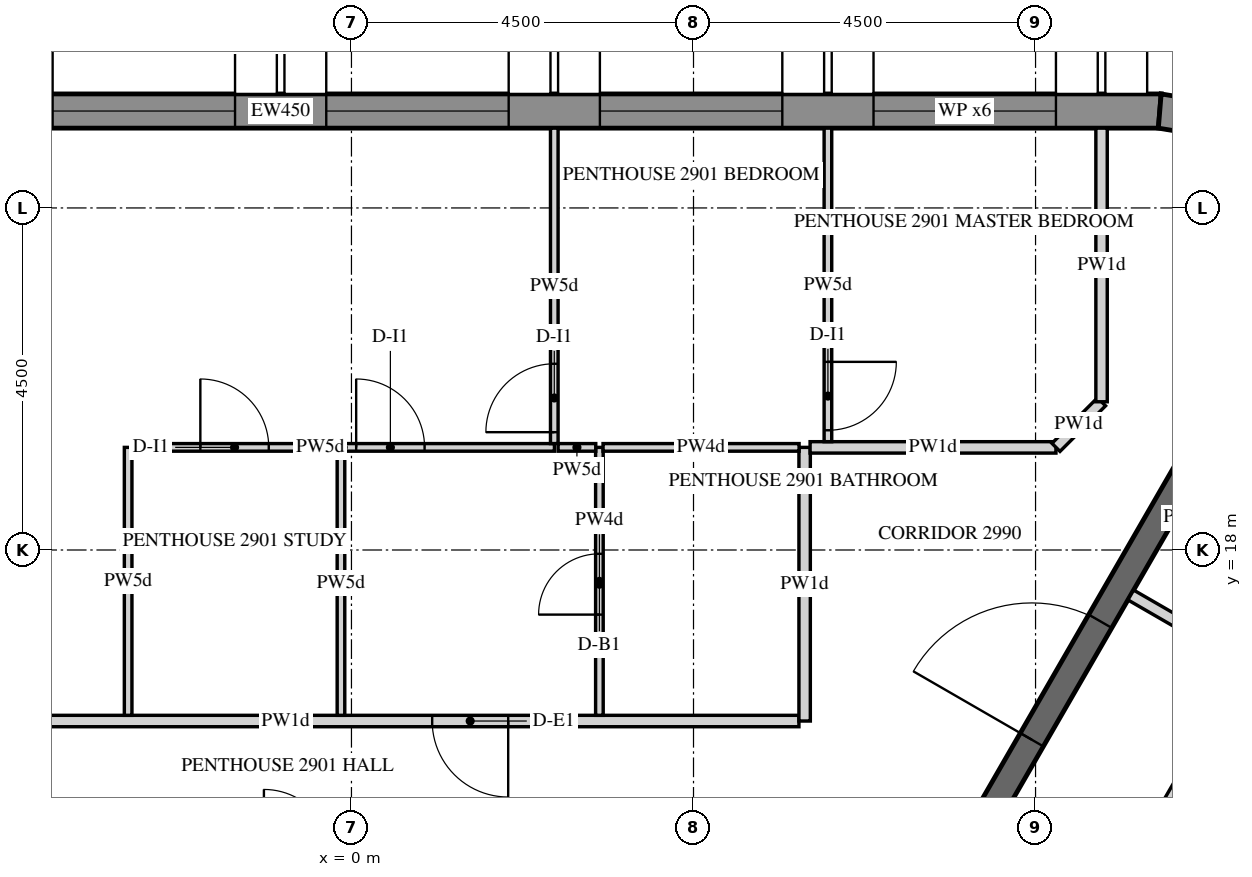
"""IFC4 building model, lengths in metres.
Left out: names, types, materials, properties, quantities, classifications, styles, units other than length and angle.
Written with IfcOpenShell. Run it as: python <this file> out.ifc"""

import sys

from ifc_helpers import new_model, si_unit, direction, frame, frame_2d, origin, place, context, subcontext, project, spatial, polyline, rectangle, outline, extrude, element, fill, save


model = new_model("IFC4")
c1 = context("Model", 3, precision=1e-05, world=origin(), true_north=direction((0.0, 1.0)))
c2 = subcontext(c1, "Body", "Model", "MODEL_VIEW")
j1 = project(units=[si_unit("LENGTHUNIT", "METRE"), si_unit("PLANEANGLEUNIT", "RADIAN")], contexts=[c1])
p1 = place(None, origin())
s1 = spatial("IfcSite", under=j1, at=p1, CompositionType="ELEMENT")
p2 = place(p1, origin())
s2 = spatial("IfcBuilding", under=s1, at=p2, CompositionType="ELEMENT")
p3 = place(p2, frame((0.0, 0.0, 369.0)))
s3 = spatial("IfcBuildingStorey", under=s2, at=p3, CompositionType="ELEMENT", Elevation=369.0)
p4 = place(p3, frame((10.634, 23.775, -0.15), z_axis=(0.0, 0.0, 1.0), x_axis=(-1.0, 0.0, 0.0)))
e1 = element("IfcWall", 1, at=p4, inside=s3, PredefinedType="SOLIDWALL", context=c2, shape_type="SweptSolid", body=[
    extrude(outline(polyline([(-0.018, -0.225), (23.153, -0.225), (23.111, 0.225), (0.018, 0.225), (-0.018, -0.225)])), origin(), (0.0, 0.0, 1.0), 3.9),
])
p5 = place(p4, frame((1.366, 0.0, 0.45)))
e2 = element("IfcOpeningElement", 2, at=p5, cuts=e1, PredefinedType="OPENING", context=c2, shape_type="SweptSolid", body=[
    extrude(rectangle(XDim=2.4, YDim=3.0, at=frame_2d((1.2, 1.5))), frame((0.0, 0.235, 0.0), z_axis=(0.0, -1.0, 0.0), x_axis=(1.0, 0.0, 0.0)), (0.0, 0.0, 1.0), 0.47),
])
p6 = place(p4, frame((4.966, 0.0, 0.45)))
e3 = element("IfcOpeningElement", 3, at=p6, cuts=e1, PredefinedType="OPENING", context=c2, shape_type="SweptSolid", body=[
    extrude(rectangle(XDim=2.4, YDim=3.0, at=frame_2d((1.2, 1.5))), frame((0.0, 0.235, 0.0), z_axis=(0.0, -1.0, 0.0), x_axis=(1.0, 0.0, 0.0)), (0.0, 0.0, 1.0), 0.47),
])
p7 = place(p4, frame((8.566, 0.0, 0.45)))
e4 = element("IfcOpeningElement", 4, at=p7, cuts=e1, PredefinedType="OPENING", context=c2, shape_type="SweptSolid", body=[
    extrude(rectangle(XDim=2.4, YDim=3.0, at=frame_2d((1.2, 1.5))), frame((0.0, 0.235, 0.0), z_axis=(0.0, -1.0, 0.0), x_axis=(1.0, 0.0, 0.0)), (0.0, 0.0, 1.0), 0.47),
])
p8 = place(p4, frame((12.166, 0.0, 0.45)))
e5 = element("IfcOpeningElement", 5, at=p8, cuts=e1, PredefinedType="OPENING", context=c2, shape_type="SweptSolid", body=[
    extrude(rectangle(XDim=2.4, YDim=3.0, at=frame_2d((1.2, 1.5))), frame((0.0, 0.235, 0.0), z_axis=(0.0, -1.0, 0.0), x_axis=(1.0, 0.0, 0.0)), (0.0, 0.0, 1.0), 0.47),
])
p9 = place(p4, frame((15.766, 0.0, 0.45)))
e6 = element("IfcOpeningElement", 6, at=p9, cuts=e1, PredefinedType="OPENING", context=c2, shape_type="SweptSolid", body=[
    extrude(rectangle(XDim=2.4, YDim=3.0, at=frame_2d((1.2, 1.5))), frame((0.0, 0.235, 0.0), z_axis=(0.0, -1.0, 0.0), x_axis=(1.0, 0.0, 0.0)), (0.0, 0.0, 1.0), 0.47),
])
p10 = place(p4, frame((19.366, 0.0, 0.45)))
e7 = element("IfcOpeningElement", 7, at=p10, cuts=e1, PredefinedType="OPENING", context=c2, shape_type="SweptSolid", body=[
    extrude(rectangle(XDim=2.4, YDim=3.0, at=frame_2d((1.2, 1.5))), frame((0.0, 0.235, 0.0), z_axis=(0.0, -1.0, 0.0), x_axis=(1.0, 0.0, 0.0)), (0.0, 0.0, 1.0), 0.47),
])
p11 = place(p3, frame((11.843, 23.576, -0.15), z_axis=(0.0, 0.0, 1.0), x_axis=(-0.986773862881, 0.162102879475, 0.0)))
e8 = element("IfcWall", 8, at=p11, inside=s3, PredefinedType="SOLIDWALL", context=c2, shape_type="SweptSolid", body=[
    extrude(outline(polyline([(-0.037, -0.225), (1.243, -0.225), (1.206, 0.225), (0.037, 0.225), (-0.037, -0.225)])), origin(), (0.0, 0.0, 1.0), 3.9),
])
p12 = place(p3, frame((5.773, 10.0, -0.15), z_axis=(0.0, 0.0, 1.0), x_axis=(0.500007911273, 0.866020836161, 0.0)))
e9 = element("IfcWall", 9, at=p12, inside=s3, PredefinedType="SHEAR", context=c2, shape_type="SweptSolid", body=[
    extrude(rectangle(XDim=14.51, YDim=0.35, at=frame_2d((7.255, 0.0))), origin(), (0.0, 0.0, 1.0), 3.9),
])
p13 = place(p12, frame((6.355, 0.0, 0.15)))
e10 = element("IfcOpeningElement", 10, at=p13, cuts=e9, PredefinedType="OPENING", context=c2, shape_type="SweptSolid", body=[
    extrude(rectangle(XDim=1.8, YDim=2.4, at=frame_2d((0.9, 1.2))), frame((0.0, 0.185, 0.0), z_axis=(0.0, -1.0, 0.0), x_axis=(1.0, 0.0, 0.0)), (0.0, 0.0, 1.0), 0.37),
])
p14 = place(p3, frame((5.887, 15.75, 0.0), z_axis=(0.0, 0.0, 1.0), x_axis=(-1.0, 0.0, 0.0)))
e11 = element("IfcWall", 11, at=p14, inside=s3, PredefinedType="PARTITIONING", context=c2, shape_type="SweptSolid", body=[
    extrude(rectangle(XDim=13.503, YDim=0.15, at=frame_2d((6.752, 0.0))), origin(), (0.0, 0.0, 1.0), 2.47),
])
p15 = place(p14, frame((3.825, 0.0, 0.0)))
e12 = element("IfcOpeningElement", 12, at=p15, cuts=e11, PredefinedType="OPENING", context=c2, shape_type="SweptSolid", body=[
    extrude(rectangle(XDim=1.0, YDim=2.1, at=frame_2d((0.5, 1.05))), frame((0.0, 0.085, 0.0), z_axis=(0.0, -1.0, 0.0), x_axis=(1.0, 0.0, 0.0)), (0.0, 0.0, 1.0), 0.17),
])
p16 = place(p3, frame((5.962, 19.35, 0.0), z_axis=(0.0, 0.0, 1.0), x_axis=(0.0, -1.0, 0.0)))
e13 = element("IfcWall", 13, at=p16, inside=s3, PredefinedType="PARTITIONING", context=c2, shape_type="SweptSolid", body=[
    extrude(rectangle(XDim=3.6, YDim=0.15, at=frame_2d((1.8, 0.0))), origin(), (0.0, 0.0, 1.0), 2.47),
])
p17 = place(p3, frame((9.268, 19.35, 0.0), z_axis=(0.0, 0.0, 1.0), x_axis=(-1.0, 0.0, 0.0)))
e14 = element("IfcWall", 14, at=p17, inside=s3, PredefinedType="PARTITIONING", context=c2, shape_type="SweptSolid", body=[
    extrude(rectangle(XDim=3.234, YDim=0.15, at=frame_2d((1.617, 0.0))), origin(), (0.0, 0.0, 1.0), 2.47),
])
p18 = place(p3, frame((9.868, 19.95, 0.0), z_axis=(0.0, 0.0, 1.0), x_axis=(-0.707250750801, -0.706962782254, 0.0)))
e15 = element("IfcWall", 15, at=p18, inside=s3, PredefinedType="PARTITIONING", context=c2, shape_type="SweptSolid", body=[
    extrude(rectangle(XDim=0.848, YDim=0.15, at=frame_2d((0.424, 0.0))), origin(), (0.0, 0.0, 1.0), 2.47),
])
p19 = place(p3, frame((9.868, 23.55, 0.0), z_axis=(0.0, 0.0, 1.0), x_axis=(0.0, -1.0, 0.0)))
e16 = element("IfcWall", 16, at=p19, inside=s3, PredefinedType="PARTITIONING", context=c2, shape_type="SweptSolid", body=[
    extrude(rectangle(XDim=3.6, YDim=0.15, at=frame_2d((1.8, 0.0))), origin(), (0.0, 0.0, 1.0), 2.47),
])
p20 = place(p3, frame((8.92, 11.499, 0.0), z_axis=(0.0, 0.0, 1.0), x_axis=(0.499984314267, 0.866034459757, 0.0)))
e17 = element("IfcWall", 17, at=p20, inside=s3, PredefinedType="PARTITIONING", context=c2, shape_type="SweptSolid", body=[
    extrude(rectangle(XDim=5.784, YDim=0.15, at=frame_2d((2.892, 0.0))), origin(), (0.0, 0.0, 1.0), 2.47),
])
p21 = place(p3, frame((11.747, 16.546, 0.0), z_axis=(0.0, 0.0, 1.0), x_axis=(-0.866013532718, 0.500020560727, 0.0)))
e18 = element("IfcWall", 18, at=p21, inside=s3, PredefinedType="PARTITIONING", context=c2, shape_type="SweptSolid", body=[
    extrude(rectangle(XDim=1.725, YDim=0.15, at=frame_2d((0.863, 0.0))), origin(), (0.0, 0.0, 1.0), 2.47),
])
p22 = place(p3, frame((-2.888, 19.35, 0.0), z_axis=(0.0, 0.0, 1.0), x_axis=(1.0, 0.0, 0.0)))
e19 = element("IfcWall", 19, at=p22, inside=s3, PredefinedType="PARTITIONING", context=c2, shape_type="SweptSolid", body=[
    extrude(rectangle(XDim=5.558, YDim=0.1, at=frame_2d((2.779, 0.0))), origin(), (0.0, 0.0, 1.0), 2.47),
])
p23 = place(p22, frame((2.95, 0.0, 0.0)))
e20 = element("IfcOpeningElement", 20, at=p23, cuts=e19, PredefinedType="OPENING", context=c2, shape_type="SweptSolid", body=[
    extrude(rectangle(XDim=0.9, YDim=2.1, at=frame_2d((0.45, 1.05))), frame((0.0, 0.06, 0.0), z_axis=(0.0, -1.0, 0.0), x_axis=(1.0, 0.0, 0.0)), (0.0, 0.0, 1.0), 0.12),
])
p24 = place(p22, frame((0.9, 0.0, 0.0)))
e21 = element("IfcOpeningElement", 21, at=p24, cuts=e19, PredefinedType="OPENING", context=c2, shape_type="SweptSolid", body=[
    extrude(rectangle(XDim=0.9, YDim=2.1, at=frame_2d((0.45, 1.05))), frame((0.0, 0.06, 0.0), z_axis=(0.0, -1.0, 0.0), x_axis=(1.0, 0.0, 0.0)), (0.0, 0.0, 1.0), 0.12),
])
p25 = place(p3, frame((2.668, 19.4, 0.0), z_axis=(0.0, 0.0, 1.0), x_axis=(0.0, 1.0, 0.0)))
e22 = element("IfcWall", 22, at=p25, inside=s3, PredefinedType="PARTITIONING", context=c2, shape_type="SweptSolid", body=[
    extrude(rectangle(XDim=4.15, YDim=0.1, at=frame_2d((2.075, 0.0))), origin(), (0.0, 0.0, 1.0), 2.47),
])
p26 = place(p25, frame((0.15, 0.0, 0.0)))
e23 = element("IfcOpeningElement", 23, at=p26, cuts=e22, PredefinedType="OPENING", context=c2, shape_type="SweptSolid", body=[
    extrude(rectangle(XDim=0.9, YDim=2.1, at=frame_2d((0.45, 1.05))), frame((0.0, 0.06, 0.0), z_axis=(0.0, -1.0, 0.0), x_axis=(1.0, 0.0, 0.0)), (0.0, 0.0, 1.0), 0.12),
])
p27 = place(p3, frame((-2.938, 15.825, 0.0), z_axis=(0.0, 0.0, 1.0), x_axis=(0.0, 1.0, 0.0)))
e24 = element("IfcWall", 24, at=p27, inside=s3, PredefinedType="PARTITIONING", context=c2, shape_type="SweptSolid", body=[
    extrude(rectangle(XDim=3.525, YDim=0.1, at=frame_2d((1.763, 0.0))), origin(), (0.0, 0.0, 1.0), 2.47),
])
p28 = place(p3, frame((3.262, 15.825, 0.0), z_axis=(0.0, 0.0, 1.0), x_axis=(0.0, 1.0, 0.0)))
e25 = element("IfcWall", 25, at=p28, inside=s3, PredefinedType="PARTITIONING", context=c2, shape_type="SweptSolid", body=[
    extrude(rectangle(XDim=3.525, YDim=0.1, at=frame_2d((1.763, 0.0))), origin(), (0.0, 0.0, 1.0), 2.47),
])
p29 = place(p28, frame((1.325, 0.0, 0.0)))
e26 = element("IfcOpeningElement", 26, at=p29, cuts=e25, PredefinedType="OPENING", context=c2, shape_type="SweptSolid", body=[
    extrude(rectangle(XDim=0.8, YDim=2.1, at=frame_2d((0.4, 1.05))), frame((0.0, 0.06, 0.0), z_axis=(0.0, -1.0, 0.0), x_axis=(1.0, 0.0, 0.0)), (0.0, 0.0, 1.0), 0.12),
])
p30 = place(p3, frame((3.214, 19.35, 0.0), z_axis=(0.0, 0.0, 1.0), x_axis=(-1.0, 0.0, 0.0)))
e27 = element("IfcWall", 27, at=p30, inside=s3, PredefinedType="PARTITIONING", context=c2, shape_type="SweptSolid", body=[
    extrude(rectangle(XDim=0.496, YDim=0.1, at=frame_2d((0.248, 0.0))), origin(), (0.0, 0.0, 1.0), 2.47),
])
p31 = place(p3, frame((-0.138, 19.3, 0.0), z_axis=(0.0, 0.0, 1.0), x_axis=(0.0, -1.0, 0.0)))
e28 = element("IfcWall", 28, at=p31, inside=s3, PredefinedType="PARTITIONING", context=c2, shape_type="SweptSolid", body=[
    extrude(rectangle(XDim=3.475, YDim=0.1, at=frame_2d((1.738, 0.0))), origin(), (0.0, 0.0, 1.0), 2.47),
])
p32 = place(p3, frame((5.889, 19.35, 0.0), z_axis=(0.0, 0.0, 1.0), x_axis=(-1.0, 0.0, 0.0)))
e29 = element("IfcWall", 29, at=p32, inside=s3, PredefinedType="PARTITIONING", context=c2, shape_type="SweptSolid", body=[
    extrude(rectangle(XDim=2.579, YDim=0.1, at=frame_2d((1.29, 0.0))), origin(), (0.0, 0.0, 1.0), 2.47),
])
p33 = place(p3, frame((6.268, 23.55, 0.0), z_axis=(0.0, 0.0, 1.0), x_axis=(0.0, -1.0, 0.0)))
e30 = element("IfcWall", 30, at=p33, inside=s3, PredefinedType="PARTITIONING", context=c2, shape_type="SweptSolid", body=[
    extrude(rectangle(XDim=4.125, YDim=0.1, at=frame_2d((2.062, 0.0))), origin(), (0.0, 0.0, 1.0), 2.47),
])
p34 = place(p33, frame((3.075, 0.0, 0.0)))
e31 = element("IfcOpeningElement", 31, at=p34, cuts=e30, PredefinedType="OPENING", context=c2, shape_type="SweptSolid", body=[
    extrude(rectangle(XDim=0.9, YDim=2.1, at=frame_2d((0.45, 1.05))), frame((0.0, 0.06, 0.0), z_axis=(0.0, -1.0, 0.0), x_axis=(1.0, 0.0, 0.0)), (0.0, 0.0, 1.0), 0.12),
])
p35 = place(p5, frame((0.0, 0.155, 0.0)))
e32 = element("IfcWindow", 32, at=p35, inside=s3, PartitioningType="DOUBLE_PANEL_VERTICAL", PredefinedType="WINDOW", context=c2, shape_type="SweptSolid", body=[
    extrude(rectangle(XDim=2.4, YDim=3.0, at=frame_2d((1.2, 1.5))), frame((0.0, 0.03, 0.0), z_axis=(0.0, -1.0, 0.0), x_axis=(1.0, 0.0, 0.0)), (0.0, 0.0, 1.0), 0.06),
])
fill(e2, e32)
p36 = place(p6, frame((0.0, 0.155, 0.0)))
e33 = element("IfcWindow", 33, at=p36, inside=s3, PartitioningType="DOUBLE_PANEL_VERTICAL", PredefinedType="WINDOW", context=c2, shape_type="SweptSolid", body=[
    extrude(rectangle(XDim=2.4, YDim=3.0, at=frame_2d((1.2, 1.5))), frame((0.0, 0.03, 0.0), z_axis=(0.0, -1.0, 0.0), x_axis=(1.0, 0.0, 0.0)), (0.0, 0.0, 1.0), 0.06),
])
fill(e3, e33)
p37 = place(p7, frame((0.0, 0.155, 0.0)))
e34 = element("IfcWindow", 34, at=p37, inside=s3, PartitioningType="DOUBLE_PANEL_VERTICAL", PredefinedType="WINDOW", context=c2, shape_type="SweptSolid", body=[
    extrude(rectangle(XDim=2.4, YDim=3.0, at=frame_2d((1.2, 1.5))), frame((0.0, 0.03, 0.0), z_axis=(0.0, -1.0, 0.0), x_axis=(1.0, 0.0, 0.0)), (0.0, 0.0, 1.0), 0.06),
])
fill(e4, e34)
p38 = place(p8, frame((0.0, 0.155, 0.0)))
e35 = element("IfcWindow", 35, at=p38, inside=s3, PartitioningType="DOUBLE_PANEL_VERTICAL", PredefinedType="WINDOW", context=c2, shape_type="SweptSolid", body=[
    extrude(rectangle(XDim=2.4, YDim=3.0, at=frame_2d((1.2, 1.5))), frame((0.0, 0.03, 0.0), z_axis=(0.0, -1.0, 0.0), x_axis=(1.0, 0.0, 0.0)), (0.0, 0.0, 1.0), 0.06),
])
fill(e5, e35)
p39 = place(p13, origin())
e36 = element("IfcDoor", 36, at=p39, inside=s3, OperationType="DOUBLE_DOOR_SINGLE_SWING", PredefinedType="DOOR", context=c2, shape_type="SweptSolid", body=[
    extrude(rectangle(XDim=1.8, YDim=2.4, at=frame_2d((0.9, 1.2))), frame((0.0, 0.025, 0.0), z_axis=(0.0, -1.0, 0.0), x_axis=(1.0, 0.0, 0.0)), (0.0, 0.0, 1.0), 0.05),
])
fill(e10, e36)
p40 = place(p15, origin())
e37 = element("IfcDoor", 37, at=p40, inside=s3, OperationType="SINGLE_SWING_RIGHT", PredefinedType="DOOR", context=c2, shape_type="SweptSolid", body=[
    extrude(rectangle(XDim=1.0, YDim=2.1, at=frame_2d((0.5, 1.05))), frame((0.0, 0.025, 0.0), z_axis=(0.0, -1.0, 0.0), x_axis=(1.0, 0.0, 0.0)), (0.0, 0.0, 1.0), 0.05),
])
fill(e12, e37)
p41 = place(p29, origin())
e38 = element("IfcDoor", 38, at=p41, inside=s3, OperationType="SINGLE_SWING_RIGHT", PredefinedType="DOOR", context=c2, shape_type="SweptSolid", body=[
    extrude(rectangle(XDim=0.8, YDim=2.1, at=frame_2d((0.4, 1.05))), frame((0.0, 0.025, 0.0), z_axis=(0.0, -1.0, 0.0), x_axis=(1.0, 0.0, 0.0)), (0.0, 0.0, 1.0), 0.05),
])
fill(e26, e38)
p42 = place(p23, origin())
e39 = element("IfcDoor", 39, at=p42, inside=s3, OperationType="SINGLE_SWING_RIGHT", PredefinedType="DOOR", context=c2, shape_type="SweptSolid", body=[
    extrude(rectangle(XDim=0.9, YDim=2.1, at=frame_2d((0.45, 1.05))), frame((0.0, 0.025, 0.0), z_axis=(0.0, -1.0, 0.0), x_axis=(1.0, 0.0, 0.0)), (0.0, 0.0, 1.0), 0.05),
])
fill(e20, e39)
p43 = place(p34, origin())
e40 = element("IfcDoor", 40, at=p43, inside=s3, OperationType="SINGLE_SWING_RIGHT", PredefinedType="DOOR", context=c2, shape_type="SweptSolid", body=[
    extrude(rectangle(XDim=0.9, YDim=2.1, at=frame_2d((0.45, 1.05))), frame((0.0, 0.025, 0.0), z_axis=(0.0, -1.0, 0.0), x_axis=(1.0, 0.0, 0.0)), (0.0, 0.0, 1.0), 0.05),
])
fill(e31, e40)
p44 = place(p26, origin())
e41 = element("IfcDoor", 41, at=p44, inside=s3, OperationType="SINGLE_SWING_RIGHT", PredefinedType="DOOR", context=c2, shape_type="SweptSolid", body=[
    extrude(rectangle(XDim=0.9, YDim=2.1, at=frame_2d((0.45, 1.05))), frame((0.0, 0.025, 0.0), z_axis=(0.0, -1.0, 0.0), x_axis=(1.0, 0.0, 0.0)), (0.0, 0.0, 1.0), 0.05),
])
fill(e23, e41)
p45 = place(p24, origin())
e42 = element("IfcDoor", 42, at=p45, inside=s3, OperationType="SINGLE_SWING_RIGHT", PredefinedType="DOOR", context=c2, shape_type="SweptSolid", body=[
    extrude(rectangle(XDim=0.9, YDim=2.1, at=frame_2d((0.45, 1.05))), frame((0.0, 0.025, 0.0), z_axis=(0.0, -1.0, 0.0), x_axis=(1.0, 0.0, 0.0)), (0.0, 0.0, 1.0), 0.05),
])
fill(e21, e42)
save(model, sys.argv[1])
